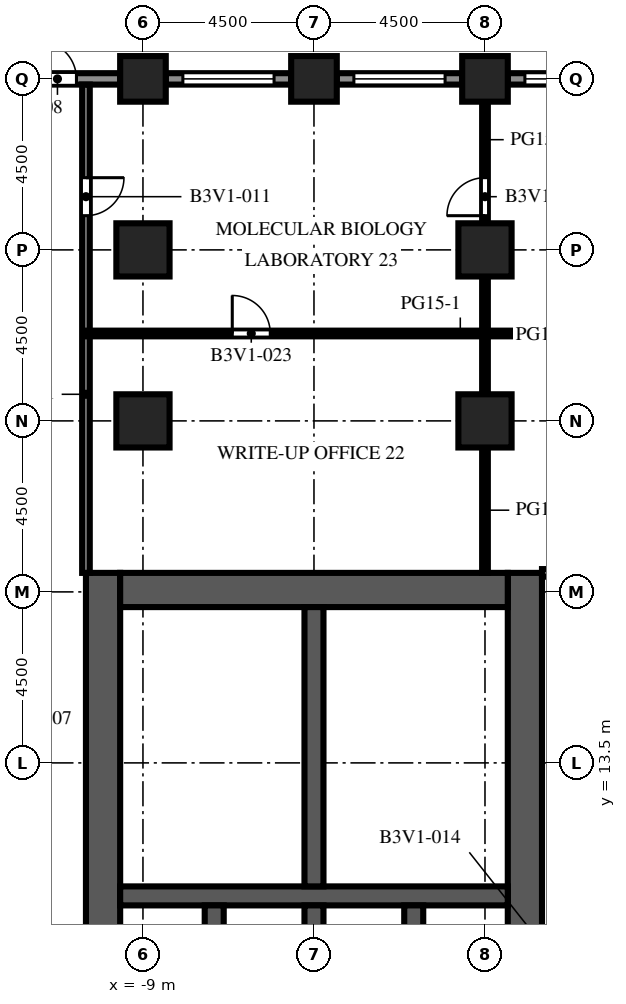
"""IFC4 building model, lengths in metres.
Left out: names, types, materials, properties, quantities, classifications, styles, units other than length and angle.
Written with IfcOpenShell. Run it as: python <this file> out.ifc"""

import sys

from ifc_helpers import new_model, si_unit, direction, frame, frame_2d, origin, origin_2d, place, context, subcontext, project, spatial, rectangle, extrude, element, fill, save


model = new_model("IFC4")
c1 = context("Model", 3, precision=1e-05, world=origin(), true_north=direction((0.0, 1.0)))
c2 = subcontext(c1, "Body", "Model", "MODEL_VIEW")
j1 = project(units=[si_unit("LENGTHUNIT", "METRE"), si_unit("PLANEANGLEUNIT", "RADIAN")], contexts=[c1])
p1 = place(None, origin())
s1 = spatial("IfcSite", under=j1, at=p1, CompositionType="ELEMENT")
p2 = place(p1, origin())
s2 = spatial("IfcBuilding", under=s1, at=p2, CompositionType="ELEMENT")
p3 = place(p2, frame((0.0, 0.0, 90.2)))
s3 = spatial("IfcBuildingStorey", under=s2, at=p3, CompositionType="ELEMENT", Elevation=90.2)
for number, where, z_axis, x_axis in (
    (1, (-9.0, 31.5, 0.0), (0.0, 0.0, 1.0), (1.0, 0.0, 0.0)),
    (2, (-4.5, 31.5, 0.0), (0.0, 0.0, 1.0), (1.0, 0.0, 0.0)),
    (3, (0.0, 31.5, 0.0), (0.0, 0.0, 1.0), (1.0, 0.0, 0.0)),
):
    element("IfcColumn", number, at=place(p3, frame(where, z_axis=z_axis, x_axis=x_axis)), inside=s3, PredefinedType="COLUMN", context=c2, shape_type="SweptSolid", body=[
        extrude(rectangle(XDim=1.2, YDim=1.2, at=origin_2d()), origin(), (0.0, 0.0, 1.0), 4.1),
    ])
for number, where, z_axis, x_axis in (
    (4, (-9.0, 22.5, 0.0), (0.0, 0.0, 1.0), (1.0, 0.0, 0.0)),
    (5, (-9.0, 27.0, 0.0), (0.0, 0.0, 1.0), (1.0, 0.0, 0.0)),
    (6, (0.0, 22.5, 0.0), (0.0, 0.0, 1.0), (1.0, 0.0, 0.0)),
    (7, (0.0, 27.0, 0.0), (0.0, 0.0, 1.0), (1.0, 0.0, 0.0)),
):
    element("IfcColumn", number, at=place(p3, frame(where, z_axis=z_axis, x_axis=x_axis)), inside=s3, PredefinedType="COLUMN", context=c2, shape_type="SweptSolid", body=[
        extrude(rectangle(XDim=1.4, YDim=1.4, at=origin_2d()), origin(), (0.0, 0.0, 1.0), 4.1),
    ])
p4 = place(p3, frame((-10.05, -9.0, 0.0), z_axis=(0.0, 0.0, 1.0), x_axis=(0.0, 1.0, 0.0)))
e8 = element("IfcWall", 8, at=p4, inside=s3, PredefinedType="SHEAR", context=c2, shape_type="SweptSolid", body=[
    extrude(rectangle(XDim=27.5, YDim=0.9, at=frame_2d((13.75, 0.0))), origin(), (0.0, 0.0, 1.0), 4.1),
])
p5 = place(p4, frame((12.55, 0.0, 0.0)))
e9 = element("IfcOpeningElement", 9, at=p5, cuts=e8, PredefinedType="OPENING", context=c2, shape_type="SweptSolid", body=[
    extrude(rectangle(XDim=2.4, YDim=2.4, at=frame_2d((1.2, 1.2))), frame((0.0, 0.46, 0.0), z_axis=(0.0, -1.0, 0.0), x_axis=(1.0, 0.0, 0.0)), (0.0, 0.0, 1.0), 0.92),
])
p6 = place(p4, frame((6.825, 0.0, 0.0)))
e10 = element("IfcOpeningElement", 10, at=p6, cuts=e8, PredefinedType="OPENING", context=c2, shape_type="SweptSolid", body=[
    extrude(rectangle(XDim=1.2, YDim=2.1, at=frame_2d((0.6, 1.05))), frame((0.0, 0.46, 0.0), z_axis=(0.0, -1.0, 0.0), x_axis=(1.0, 0.0, 0.0)), (0.0, 0.0, 1.0), 0.92),
])
p7 = place(p4, frame((19.475, 0.0, 0.0)))
e11 = element("IfcOpeningElement", 11, at=p7, cuts=e8, PredefinedType="OPENING", context=c2, shape_type="SweptSolid", body=[
    extrude(rectangle(XDim=1.2, YDim=2.1, at=frame_2d((0.6, 1.05))), frame((0.0, 0.46, 0.0), z_axis=(0.0, -1.0, 0.0), x_axis=(1.0, 0.0, 0.0)), (0.0, 0.0, 1.0), 0.92),
])
p8 = place(p3, frame((1.05, -9.0, 0.0), z_axis=(0.0, 0.0, 1.0), x_axis=(0.0, 1.0, 0.0)))
e12 = element("IfcWall", 12, at=p8, inside=s3, PredefinedType="SHEAR", context=c2, shape_type="SweptSolid", body=[
    extrude(rectangle(XDim=27.5, YDim=0.9, at=frame_2d((13.75, 0.0))), origin(), (0.0, 0.0, 1.0), 4.1),
])
p9 = place(p8, frame((12.55, 0.0, 0.0)))
e13 = element("IfcOpeningElement", 13, at=p9, cuts=e12, PredefinedType="OPENING", context=c2, shape_type="SweptSolid", body=[
    extrude(rectangle(XDim=2.4, YDim=2.4, at=frame_2d((1.2, 1.2))), frame((0.0, 0.46, 0.0), z_axis=(0.0, -1.0, 0.0), x_axis=(1.0, 0.0, 0.0)), (0.0, 0.0, 1.0), 0.92),
])
p10 = place(p8, frame((3.975, 0.0, 0.0)))
e14 = element("IfcOpeningElement", 14, at=p10, cuts=e12, PredefinedType="OPENING", context=c2, shape_type="SweptSolid", body=[
    extrude(rectangle(XDim=1.2, YDim=2.1, at=frame_2d((0.6, 1.05))), frame((0.0, 0.46, 0.0), z_axis=(0.0, -1.0, 0.0), x_axis=(1.0, 0.0, 0.0)), (0.0, 0.0, 1.0), 0.92),
])
p11 = place(p8, frame((22.325, 0.0, 0.0)))
e15 = element("IfcOpeningElement", 15, at=p11, cuts=e12, PredefinedType="OPENING", context=c2, shape_type="SweptSolid", body=[
    extrude(rectangle(XDim=1.2, YDim=2.1, at=frame_2d((0.6, 1.05))), frame((0.0, 0.46, 0.0), z_axis=(0.0, -1.0, 0.0), x_axis=(1.0, 0.0, 0.0)), (0.0, 0.0, 1.0), 0.92),
])
p12 = place(p3, frame((-9.6, 18.05, 0.0), z_axis=(0.0, 0.0, 1.0), x_axis=(1.0, 0.0, 0.0)))
e16 = element("IfcWall", 16, at=p12, inside=s3, PredefinedType="SHEAR", context=c2, shape_type="SweptSolid", body=[
    extrude(rectangle(XDim=10.2, YDim=0.9, at=frame_2d((5.1, 0.0))), origin(), (0.0, 0.0, 1.0), 4.1),
])
p13 = place(p3, frame((-9.6, 10.0, 0.0), z_axis=(0.0, 0.0, 1.0), x_axis=(1.0, 0.0, 0.0)))
e17 = element("IfcWall", 17, at=p13, inside=s3, PredefinedType="SHEAR", context=c2, shape_type="SweptSolid", body=[
    extrude(rectangle(XDim=10.2, YDim=0.5, at=frame_2d((5.1, 0.0))), origin(), (0.0, 0.0, 1.0), 4.1),
])
for number, where, z_axis, x_axis in (
    (18, (-7.125, 6.95, 0.0), (0.0, 0.0, 1.0), (0.0, 1.0, 0.0)),
    (19, (-4.5, 6.95, 0.0), (0.0, 0.0, 1.0), (0.0, 1.0, 0.0)),
    (20, (-1.875, 6.95, 0.0), (0.0, 0.0, 1.0), (0.0, 1.0, 0.0)),
):
    element("IfcWall", number, at=place(p3, frame(where, z_axis=z_axis, x_axis=x_axis)), inside=s3, PredefinedType="SHEAR", context=c2, shape_type="SweptSolid", body=[
        extrude(rectangle(XDim=2.8, YDim=0.5, at=frame_2d((1.4, 0.0))), origin(), (0.0, 0.0, 1.0), 4.1),
    ])
p14 = place(p3, frame((-4.5, 10.25, 0.0), z_axis=(0.0, 0.0, 1.0), x_axis=(0.0, 1.0, 0.0)))
e21 = element("IfcWall", 21, at=p14, inside=s3, PredefinedType="SHEAR", context=c2, shape_type="SweptSolid", body=[
    extrude(rectangle(XDim=7.35, YDim=0.5, at=frame_2d((3.675, 0.0))), origin(), (0.0, 0.0, 1.0), 4.1),
])
p15 = place(p3, frame((0.6, 31.5, 0.0), z_axis=(0.0, 0.0, 1.0), x_axis=(1.0, 0.0, 0.0)))
e22 = element("IfcWall", 22, at=p15, inside=s3, PredefinedType="SOLIDWALL", context=c2, shape_type="SweptSolid", body=[
    extrude(rectangle(XDim=3.3, YDim=0.3, at=frame_2d((1.65, 0.0))), origin(), (0.0, 0.0, 1.0), 2.75),
])
p16 = place(p15, frame((0.45, 0.0, 0.8)))
e23 = element("IfcOpeningElement", 23, at=p16, cuts=e22, PredefinedType="OPENING", context=c2, shape_type="SweptSolid", body=[
    extrude(rectangle(XDim=2.4, YDim=1.7, at=frame_2d((1.2, 0.85))), frame((0.0, 0.16, 0.0), z_axis=(0.0, -1.0, 0.0), x_axis=(1.0, 0.0, 0.0)), (0.0, 0.0, 1.0), 0.32),
])
p17 = place(p3, frame((-3.9, 31.5, 0.0), z_axis=(0.0, 0.0, 1.0), x_axis=(1.0, 0.0, 0.0)))
e24 = element("IfcWall", 24, at=p17, inside=s3, PredefinedType="SOLIDWALL", context=c2, shape_type="SweptSolid", body=[
    extrude(rectangle(XDim=3.3, YDim=0.3, at=frame_2d((1.65, 0.0))), origin(), (0.0, 0.0, 1.0), 2.75),
])
p18 = place(p17, frame((0.45, 0.0, 0.8)))
e25 = element("IfcOpeningElement", 25, at=p18, cuts=e24, PredefinedType="OPENING", context=c2, shape_type="SweptSolid", body=[
    extrude(rectangle(XDim=2.4, YDim=1.7, at=frame_2d((1.2, 0.85))), frame((0.0, 0.16, 0.0), z_axis=(0.0, -1.0, 0.0), x_axis=(1.0, 0.0, 0.0)), (0.0, 0.0, 1.0), 0.32),
])
p19 = place(p3, frame((-8.4, 31.5, 0.0), z_axis=(0.0, 0.0, 1.0), x_axis=(1.0, 0.0, 0.0)))
e26 = element("IfcWall", 26, at=p19, inside=s3, PredefinedType="SOLIDWALL", context=c2, shape_type="SweptSolid", body=[
    extrude(rectangle(XDim=3.3, YDim=0.3, at=frame_2d((1.65, 0.0))), origin(), (0.0, 0.0, 1.0), 2.75),
])
p20 = place(p19, frame((0.45, 0.0, 0.8)))
e27 = element("IfcOpeningElement", 27, at=p20, cuts=e26, PredefinedType="OPENING", context=c2, shape_type="SweptSolid", body=[
    extrude(rectangle(XDim=2.4, YDim=1.7, at=frame_2d((1.2, 0.85))), frame((0.0, 0.16, 0.0), z_axis=(0.0, -1.0, 0.0), x_axis=(1.0, 0.0, 0.0)), (0.0, 0.0, 1.0), 0.32),
])
p21 = place(p3, frame((-12.9, 31.5, 0.0), z_axis=(0.0, 0.0, 1.0), x_axis=(1.0, 0.0, 0.0)))
e28 = element("IfcWall", 28, at=p21, inside=s3, PredefinedType="SOLIDWALL", context=c2, shape_type="SweptSolid", body=[
    extrude(rectangle(XDim=3.3, YDim=0.3, at=frame_2d((1.65, 0.0))), origin(), (0.0, 0.0, 1.0), 2.75),
])
p22 = place(p21, frame((1.15, 0.0, 0.0)))
e29 = element("IfcOpeningElement", 29, at=p22, cuts=e28, PredefinedType="OPENING", context=c2, shape_type="SweptSolid", body=[
    extrude(rectangle(XDim=1.0, YDim=2.2, at=frame_2d((0.5, 1.1))), frame((0.0, 0.16, 0.0), z_axis=(0.0, -1.0, 0.0), x_axis=(1.0, 0.0, 0.0)), (0.0, 0.0, 1.0), 0.32),
])
p23 = place(p3, frame((-0.8, 10.25, 0.0), z_axis=(0.0, 0.0, 1.0), x_axis=(0.0, 1.0, 0.0)))
e30 = element("IfcWall", 30, at=p23, inside=s3, PredefinedType="PARTITIONING", context=c2, shape_type="SweptSolid", body=[
    extrude(rectangle(XDim=2.205, YDim=0.1, at=frame_2d((1.103, 0.0))), origin(), (0.0, 0.0, 1.0), 3.65),
])
p24 = place(p23, frame((0.603, 0.0, 0.0)))
e31 = element("IfcOpeningElement", 31, at=p24, cuts=e30, PredefinedType="OPENING", context=c2, shape_type="SweptSolid", body=[
    extrude(rectangle(XDim=1.0, YDim=2.1, at=frame_2d((0.5, 1.05))), frame((0.0, 0.06, 0.0), z_axis=(0.0, -1.0, 0.0), x_axis=(1.0, 0.0, 0.0)), (0.0, 0.0, 1.0), 0.12),
])
p25 = place(p3, frame((-0.8, 12.455, 0.0), z_axis=(0.0, 0.0, 1.0), x_axis=(0.0, 1.0, 0.0)))
e32 = element("IfcWall", 32, at=p25, inside=s3, PredefinedType="PARTITIONING", context=c2, shape_type="SweptSolid", body=[
    extrude(rectangle(XDim=2.352, YDim=0.1, at=frame_2d((1.176, 0.0))), origin(), (0.0, 0.0, 1.0), 3.65),
])
p26 = place(p25, frame((0.676, 0.0, 0.0)))
e33 = element("IfcOpeningElement", 33, at=p26, cuts=e32, PredefinedType="OPENING", context=c2, shape_type="SweptSolid", body=[
    extrude(rectangle(XDim=1.0, YDim=2.1, at=frame_2d((0.5, 1.05))), frame((0.0, 0.06, 0.0), z_axis=(0.0, -1.0, 0.0), x_axis=(1.0, 0.0, 0.0)), (0.0, 0.0, 1.0), 0.12),
])
p27 = place(p3, frame((-0.8, 14.807, 0.0), z_axis=(0.0, 0.0, 1.0), x_axis=(0.0, 1.0, 0.0)))
e34 = element("IfcWall", 34, at=p27, inside=s3, PredefinedType="PARTITIONING", context=c2, shape_type="SweptSolid", body=[
    extrude(rectangle(XDim=2.793, YDim=0.1, at=frame_2d((1.396, 0.0))), origin(), (0.0, 0.0, 1.0), 3.65),
])
p28 = place(p27, frame((0.896, 0.0, 0.0)))
e35 = element("IfcOpeningElement", 35, at=p28, cuts=e34, PredefinedType="OPENING", context=c2, shape_type="SweptSolid", body=[
    extrude(rectangle(XDim=1.0, YDim=2.1, at=frame_2d((0.5, 1.05))), frame((0.0, 0.06, 0.0), z_axis=(0.0, -1.0, 0.0), x_axis=(1.0, 0.0, 0.0)), (0.0, 0.0, 1.0), 0.12),
])
for number, where, z_axis, x_axis in (
    (36, (-4.25, 12.455, 0.0), (0.0, 0.0, 1.0), (1.0, 0.0, 0.0)),
    (37, (-4.25, 14.807, 0.0), (0.0, 0.0, 1.0), (1.0, 0.0, 0.0)),
):
    element("IfcWall", number, at=place(p3, frame(where, z_axis=z_axis, x_axis=x_axis)), inside=s3, PredefinedType="PARTITIONING", context=c2, shape_type="SweptSolid", body=[
        extrude(rectangle(XDim=3.45, YDim=0.1, at=frame_2d((1.725, 0.0))), origin(), (0.0, 0.0, 1.0), 3.65),
    ])
p29 = place(p3, frame((-10.5, 31.35, 0.0), z_axis=(0.0, 0.0, 1.0), x_axis=(0.0, -1.0, 0.0)))
e38 = element("IfcWall", 38, at=p29, inside=s3, PredefinedType="PARTITIONING", context=c2, shape_type="SweptSolid", body=[
    extrude(rectangle(XDim=12.85, YDim=0.2, at=frame_2d((6.425, 0.0))), origin(), (0.0, 0.0, 1.0), 3.65),
])
p30 = place(p29, frame((2.45, 0.0, 0.0)))
e39 = element("IfcOpeningElement", 39, at=p30, cuts=e38, PredefinedType="OPENING", context=c2, shape_type="SweptSolid", body=[
    extrude(rectangle(XDim=1.0, YDim=2.1, at=frame_2d((0.5, 1.05))), frame((0.0, 0.11, 0.0), z_axis=(0.0, -1.0, 0.0), x_axis=(1.0, 0.0, 0.0)), (0.0, 0.0, 1.0), 0.22),
])
p31 = place(p3, frame((0.0, 18.5, 0.0), z_axis=(0.0, 0.0, 1.0), x_axis=(0.0, 1.0, 0.0)))
e40 = element("IfcWall", 40, at=p31, inside=s3, PredefinedType="PARTITIONING", context=c2, shape_type="SweptSolid", body=[
    extrude(rectangle(XDim=3.3, YDim=0.15, at=frame_2d((1.65, 0.0))), origin(), (0.0, 0.0, 1.0), 3.65),
])
p32 = place(p3, frame((0.0, 23.2, 0.0), z_axis=(0.0, 0.0, 1.0), x_axis=(0.0, 1.0, 0.0)))
e41 = element("IfcWall", 41, at=p32, inside=s3, PredefinedType="PARTITIONING", context=c2, shape_type="SweptSolid", body=[
    extrude(rectangle(XDim=3.1, YDim=0.15, at=frame_2d((1.55, 0.0))), origin(), (0.0, 0.0, 1.0), 3.65),
])
p33 = place(p3, frame((0.0, 30.9, 0.0), z_axis=(0.0, 0.0, 1.0), x_axis=(0.0, -1.0, 0.0)))
e42 = element("IfcWall", 42, at=p33, inside=s3, PredefinedType="PARTITIONING", context=c2, shape_type="SweptSolid", body=[
    extrude(rectangle(XDim=3.2, YDim=0.15, at=frame_2d((1.6, 0.0))), origin(), (0.0, 0.0, 1.0), 3.65),
])
p34 = place(p33, frame((2.0, 0.0, 0.0)))
e43 = element("IfcOpeningElement", 43, at=p34, cuts=e42, PredefinedType="OPENING", context=c2, shape_type="SweptSolid", body=[
    extrude(rectangle(XDim=1.0, YDim=2.1, at=frame_2d((0.5, 1.05))), frame((0.0, 0.085, 0.0), z_axis=(0.0, -1.0, 0.0), x_axis=(1.0, 0.0, 0.0)), (0.0, 0.0, 1.0), 0.17),
])
p35 = place(p3, frame((1.5, 18.5, 0.0), z_axis=(0.0, 0.0, 1.0), x_axis=(1.0, 0.0, 0.0)))
e44 = element("IfcWall", 44, at=p35, inside=s3, PredefinedType="PARTITIONING", context=c2, shape_type="SweptSolid", body=[
    extrude(rectangle(XDim=4.5, YDim=0.2, at=frame_2d((2.25, 0.0))), origin(), (0.0, 0.0, 1.0), 3.65),
])
p36 = place(p3, frame((18.0, 24.8, 0.0), z_axis=(0.0, 0.0, 1.0), x_axis=(-1.0, 0.0, 0.0)))
e45 = element("IfcWall", 45, at=p36, inside=s3, PredefinedType="PARTITIONING", context=c2, shape_type="SweptSolid", body=[
    extrude(rectangle(XDim=28.5, YDim=0.15, at=frame_2d((14.25, 0.0))), origin(), (0.0, 0.0, 1.0), 3.65),
])
p37 = place(p36, frame((23.65, 0.0, 0.0)))
e46 = element("IfcOpeningElement", 46, at=p37, cuts=e45, PredefinedType="OPENING", context=c2, shape_type="SweptSolid", body=[
    extrude(rectangle(XDim=1.0, YDim=2.1, at=frame_2d((0.5, 1.05))), frame((0.0, 0.085, 0.0), z_axis=(0.0, -1.0, 0.0), x_axis=(1.0, 0.0, 0.0)), (0.0, 0.0, 1.0), 0.17),
])
p38 = place(p36, frame((12.65, 0.0, 0.0)))
e47 = element("IfcOpeningElement", 47, at=p38, cuts=e45, PredefinedType="OPENING", context=c2, shape_type="SweptSolid", body=[
    extrude(rectangle(XDim=1.0, YDim=2.1, at=frame_2d((0.5, 1.05))), frame((0.0, 0.085, 0.0), z_axis=(0.0, -1.0, 0.0), x_axis=(1.0, 0.0, 0.0)), (0.0, 0.0, 1.0), 0.17),
])
p39 = place(p36, frame((1.9, 0.0, 0.0)))
e48 = element("IfcOpeningElement", 48, at=p39, cuts=e45, PredefinedType="OPENING", context=c2, shape_type="SweptSolid", body=[
    extrude(rectangle(XDim=1.0, YDim=2.1, at=frame_2d((0.5, 1.05))), frame((0.0, 0.085, 0.0), z_axis=(0.0, -1.0, 0.0), x_axis=(1.0, 0.0, 0.0)), (0.0, 0.0, 1.0), 0.17),
])
p40 = place(p16, origin())
e49 = element("IfcWindow", 49, at=p40, inside=s3, PartitioningType="SINGLE_PANEL", PredefinedType="WINDOW", context=c2, shape_type="SweptSolid", body=[
    extrude(rectangle(XDim=2.4, YDim=1.7, at=frame_2d((1.2, 0.85))), frame((0.0, 0.03, 0.0), z_axis=(0.0, -1.0, 0.0), x_axis=(1.0, 0.0, 0.0)), (0.0, 0.0, 1.0), 0.06),
])
fill(e23, e49)
p41 = place(p18, origin())
e50 = element("IfcWindow", 50, at=p41, inside=s3, PartitioningType="SINGLE_PANEL", PredefinedType="WINDOW", context=c2, shape_type="SweptSolid", body=[
    extrude(rectangle(XDim=2.4, YDim=1.7, at=frame_2d((1.2, 0.85))), frame((0.0, 0.03, 0.0), z_axis=(0.0, -1.0, 0.0), x_axis=(1.0, 0.0, 0.0)), (0.0, 0.0, 1.0), 0.06),
])
fill(e25, e50)
p42 = place(p20, origin())
e51 = element("IfcWindow", 51, at=p42, inside=s3, PartitioningType="SINGLE_PANEL", PredefinedType="WINDOW", context=c2, shape_type="SweptSolid", body=[
    extrude(rectangle(XDim=2.4, YDim=1.7, at=frame_2d((1.2, 0.85))), frame((0.0, 0.03, 0.0), z_axis=(0.0, -1.0, 0.0), x_axis=(1.0, 0.0, 0.0)), (0.0, 0.0, 1.0), 0.06),
])
fill(e27, e51)
p43 = place(p22, origin())
e52 = element("IfcDoor", 52, at=p43, inside=s3, OperationType="SINGLE_SWING_LEFT", PredefinedType="DOOR", context=c2, shape_type="SweptSolid", body=[
    extrude(rectangle(XDim=1.0, YDim=2.2, at=frame_2d((0.5, 1.1))), frame((0.0, 0.025, 0.0), z_axis=(0.0, -1.0, 0.0), x_axis=(1.0, 0.0, 0.0)), (0.0, 0.0, 1.0), 0.05),
])
fill(e29, e52)
p44 = place(p7, origin())
e53 = element("IfcDoor", 53, at=p44, inside=s3, OperationType="SINGLE_SWING_LEFT", PredefinedType="DOOR", context=c2, shape_type="SweptSolid", body=[
    extrude(rectangle(XDim=1.2, YDim=2.1, at=frame_2d((0.6, 1.05))), frame((0.0, 0.025, 0.0), z_axis=(0.0, -1.0, 0.0), x_axis=(1.0, 0.0, 0.0)), (0.0, 0.0, 1.0), 0.05),
])
fill(e11, e53)
p45 = place(p11, origin())
e54 = element("IfcDoor", 54, at=p45, inside=s3, OperationType="SINGLE_SWING_LEFT", PredefinedType="DOOR", context=c2, shape_type="SweptSolid", body=[
    extrude(rectangle(XDim=1.2, YDim=2.1, at=frame_2d((0.6, 1.05))), frame((0.0, 0.425, 0.0), z_axis=(0.0, -1.0, 0.0), x_axis=(1.0, 0.0, 0.0)), (0.0, 0.0, 1.0), 0.05),
])
fill(e15, e54)
p46 = place(p24, origin())
e55 = element("IfcDoor", 55, at=p46, inside=s3, OperationType="SINGLE_SWING_RIGHT", PredefinedType="DOOR", context=c2, shape_type="SweptSolid", body=[
    extrude(rectangle(XDim=1.0, YDim=2.1, at=frame_2d((0.5, 1.05))), frame((0.0, 0.025, 0.0), z_axis=(0.0, -1.0, 0.0), x_axis=(1.0, 0.0, 0.0)), (0.0, 0.0, 1.0), 0.05),
])
fill(e31, e55)
p47 = place(p26, origin())
e56 = element("IfcDoor", 56, at=p47, inside=s3, OperationType="SINGLE_SWING_LEFT", PredefinedType="DOOR", context=c2, shape_type="SweptSolid", body=[
    extrude(rectangle(XDim=1.0, YDim=2.1, at=frame_2d((0.5, 1.05))), frame((0.0, 0.025, 0.0), z_axis=(0.0, -1.0, 0.0), x_axis=(1.0, 0.0, 0.0)), (0.0, 0.0, 1.0), 0.05),
])
fill(e33, e56)
p48 = place(p28, origin())
e57 = element("IfcDoor", 57, at=p48, inside=s3, OperationType="SINGLE_SWING_RIGHT", PredefinedType="DOOR", context=c2, shape_type="SweptSolid", body=[
    extrude(rectangle(XDim=1.0, YDim=2.1, at=frame_2d((0.5, 1.05))), frame((0.0, 0.025, 0.0), z_axis=(0.0, -1.0, 0.0), x_axis=(1.0, 0.0, 0.0)), (0.0, 0.0, 1.0), 0.05),
])
fill(e35, e57)
p49 = place(p30, origin())
e58 = element("IfcDoor", 58, at=p49, inside=s3, OperationType="SINGLE_SWING_LEFT", PredefinedType="DOOR", context=c2, shape_type="SweptSolid", body=[
    extrude(rectangle(XDim=1.0, YDim=2.1, at=frame_2d((0.5, 1.05))), frame((0.0, 0.025, 0.0), z_axis=(0.0, -1.0, 0.0), x_axis=(1.0, 0.0, 0.0)), (0.0, 0.0, 1.0), 0.05),
])
fill(e39, e58)
p50 = place(p34, origin())
e59 = element("IfcDoor", 59, at=p50, inside=s3, OperationType="SINGLE_SWING_RIGHT", PredefinedType="DOOR", context=c2, shape_type="SweptSolid", body=[
    extrude(rectangle(XDim=1.0, YDim=2.1, at=frame_2d((0.5, 1.05))), frame((0.0, 0.025, 0.0), z_axis=(0.0, -1.0, 0.0), x_axis=(1.0, 0.0, 0.0)), (0.0, 0.0, 1.0), 0.05),
])
fill(e43, e59)
p51 = place(p37, origin())
e60 = element("IfcDoor", 60, at=p51, inside=s3, OperationType="SINGLE_SWING_RIGHT", PredefinedType="DOOR", context=c2, shape_type="SweptSolid", body=[
    extrude(rectangle(XDim=1.0, YDim=2.1, at=frame_2d((0.5, 1.05))), frame((0.0, 0.025, 0.0), z_axis=(0.0, -1.0, 0.0), x_axis=(1.0, 0.0, 0.0)), (0.0, 0.0, 1.0), 0.05),
])
fill(e46, e60)
save(model, sys.argv[1])
